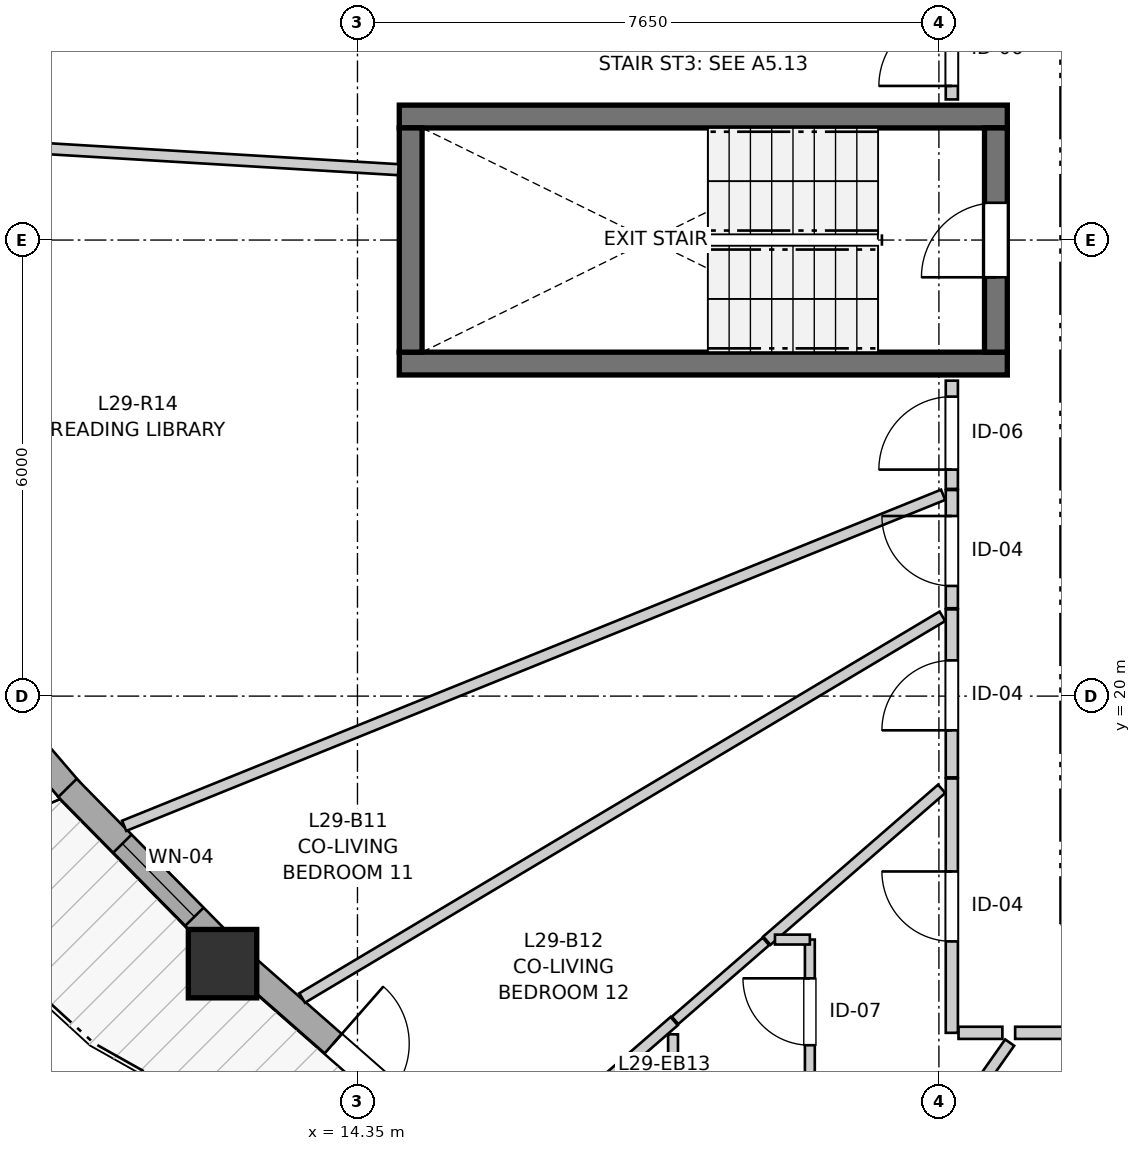
"""IFC4 building model, lengths in metres.
Left out: names, types, materials, properties, quantities, classifications, styles, units other than length and angle.
Written with IfcOpenShell. Run it as: python <this file> out.ifc"""

import sys

from ifc_helpers import new_model, si_unit, direction, frame, frame_2d, origin, origin_2d, place, context, subcontext, project, spatial, rectangle, extrude, source, transform, mapped, element, fill, save


model = new_model("IFC4")
c1 = context("Model", 3, precision=1e-05, world=origin(), true_north=direction((0.0, 1.0)))
c2 = subcontext(c1, "Body", "Model", "MODEL_VIEW")
j1 = project(units=[si_unit("LENGTHUNIT", "METRE"), si_unit("PLANEANGLEUNIT", "RADIAN")], contexts=[c1])
p1 = place(None, origin())
s1 = spatial("IfcSite", under=j1, at=p1, CompositionType="ELEMENT")
p2 = place(p1, origin())
s2 = spatial("IfcBuilding", under=s1, at=p2, CompositionType="ELEMENT")
p3 = place(p2, frame((0.0, 0.0, 99.2)))
s3 = spatial("IfcBuildingStorey", under=s2, at=p3, CompositionType="ELEMENT", Elevation=99.2)
for number, where, z_axis, x_axis in (
    (1, (14.9, 24.375, 0.0), (0.0, 0.0, 1.0), (1.0, 0.0, 0.0)),
    (2, (22.9, 27.625, 0.0), (0.0, 0.0, 1.0), (-1.0, 0.0, 0.0)),
):
    element("IfcWall", number, at=place(p3, frame(where, z_axis=z_axis, x_axis=x_axis)), inside=s3, PredefinedType="SHEAR", context=c2, shape_type="SweptSolid", body=[
        extrude(rectangle(XDim=8.0, YDim=0.3, at=frame_2d((4.0, 0.0))), origin(), (0.0, 0.0, 1.0), 2.95),
    ])
p4 = place(p3, frame((15.05, 27.475, 0.0), z_axis=(0.0, 0.0, 1.0), x_axis=(0.0, -1.0, 0.0)))
e3 = element("IfcWall", 3, at=p4, inside=s3, PredefinedType="SHEAR", context=c2, shape_type="SweptSolid", body=[
    extrude(rectangle(XDim=2.95, YDim=0.3, at=frame_2d((1.475, 0.0))), origin(), (0.0, 0.0, 1.0), 2.95),
])
p5 = place(p3, frame((22.75, 24.525, 0.0), z_axis=(0.0, 0.0, 1.0), x_axis=(0.0, 1.0, 0.0)))
e4 = element("IfcWall", 4, at=p5, inside=s3, PredefinedType="SHEAR", context=c2, shape_type="SweptSolid", body=[
    extrude(rectangle(XDim=2.95, YDim=0.3, at=frame_2d((1.475, 0.0))), origin(), (0.0, 0.0, 1.0), 2.95),
])
p6 = place(p5, frame((0.985, 0.0, 0.0)))
e5 = element("IfcOpeningElement", 5, at=p6, cuts=e4, PredefinedType="OPENING", context=c2, shape_type="SweptSolid", body=[
    extrude(rectangle(XDim=0.98, YDim=2.15, at=frame_2d((0.49, 1.075))), frame((0.0, 0.16, 0.0), z_axis=(0.0, -1.0, 0.0), x_axis=(1.0, 0.0, 0.0)), (0.0, 0.0, 1.0), 0.32),
])
m1 = source(origin(), c2, "Body", "SweptSolid", [
    extrude(rectangle(XDim=0.9, YDim=0.9, at=origin_2d()), origin(), (0.0, 0.0, 1.0), 2.95),
])
p7 = place(p3, frame((12.575, 16.48, 0.0), z_axis=(0.0, 0.0, 1.0), x_axis=(1.0, 0.0, 0.0)))
e6 = element("IfcColumn", 6, at=p7, inside=s3, PredefinedType="COLUMN", context=c2, shape_type="MappedRepresentation", body=[
    mapped(m1, transform((0.0, 0.0, 0.0), x_axis=(1.0, 0.0, 0.0), y_axis=(0.0, 1.0, 0.0), z_axis=(0.0, 0.0, 1.0), scale=1.0)),
])
p8 = place(p3, frame((8.562, 21.099, 0.0), z_axis=(0.0, 0.0, 1.0), x_axis=(0.650778499588, -0.75926763692, 0.0)))
e7 = element("IfcWall", 7, at=p8, inside=s3, PredefinedType="SOLIDWALL", context=c2, shape_type="SweptSolid", body=[
    extrude(rectangle(XDim=3.124, YDim=0.34, at=frame_2d((1.562, 0.0))), origin(), (0.0, 0.0, 1.0), 2.48),
])
p9 = place(p8, frame((0.727, 0.0, 0.82)))
e8 = element("IfcOpeningElement", 8, at=p9, cuts=e7, PredefinedType="OPENING", context=c2, shape_type="SweptSolid", body=[
    extrude(rectangle(XDim=1.65, YDim=1.45, at=frame_2d((0.825, 0.725))), frame((0.0, 0.18, 0.0), z_axis=(0.0, -1.0, 0.0), x_axis=(1.0, 0.0, 0.0)), (0.0, 0.0, 1.0), 0.36),
])
p10 = place(p3, frame((10.535, 18.792, 0.0), z_axis=(0.0, 0.0, 1.0), x_axis=(0.701902141766, -0.7122733909, 0.0)))
e9 = element("IfcWall", 9, at=p10, inside=s3, PredefinedType="SOLIDWALL", context=c2, shape_type="SweptSolid", body=[
    extrude(rectangle(XDim=2.848, YDim=0.34, at=frame_2d((1.424, 0.0))), origin(), (0.0, 0.0, 1.0), 2.48),
])
p11 = place(p10, frame((1.029, 0.0, 0.82)))
e10 = element("IfcOpeningElement", 10, at=p11, cuts=e9, PredefinedType="OPENING", context=c2, shape_type="SweptSolid", body=[
    extrude(rectangle(XDim=1.35, YDim=1.45, at=frame_2d((0.675, 0.725))), frame((0.0, 0.18, 0.0), z_axis=(0.0, -1.0, 0.0), x_axis=(1.0, 0.0, 0.0)), (0.0, 0.0, 1.0), 0.36),
])
p12 = place(p3, frame((12.86, 16.456, 0.0), z_axis=(0.0, 0.0, 1.0), x_axis=(0.751500349331, -0.659732692047, 0.0)))
e11 = element("IfcWall", 11, at=p12, inside=s3, PredefinedType="SOLIDWALL", context=c2, shape_type="SweptSolid", body=[
    extrude(rectangle(XDim=2.799, YDim=0.34, at=frame_2d((1.399, 0.0))), origin(), (0.0, 0.0, 1.0), 2.48),
])
p13 = place(p12, frame((1.559, 0.0, 0.0)))
e12 = element("IfcOpeningElement", 12, at=p13, cuts=e11, PredefinedType="OPENING", context=c2, shape_type="SweptSolid", body=[
    extrude(rectangle(XDim=1.0, YDim=2.1, at=frame_2d((0.5, 1.05))), frame((0.0, 0.18, 0.0), z_axis=(0.0, -1.0, 0.0), x_axis=(1.0, 0.0, 0.0)), (0.0, 0.0, 1.0), 0.36),
])
p14 = place(p3, frame((26.473, 15.57, 0.0), z_axis=(0.0, 0.0, 1.0), x_axis=(-1.0, 0.0, 0.0)))
e13 = element("IfcWall", 13, at=p14, inside=s3, PredefinedType="PARTITIONING", context=c2, shape_type="SweptSolid", body=[
    extrude(rectangle(XDim=3.47, YDim=0.16, at=frame_2d((1.735, 0.0))), origin(), (0.0, 0.0, 1.0), 2.95),
])
p15 = place(p14, frame((1.274, 0.0, 0.0)))
e14 = element("IfcOpeningElement", 14, at=p15, cuts=e13, PredefinedType="OPENING", context=c2, shape_type="SweptSolid", body=[
    extrude(rectangle(XDim=0.92, YDim=2.1, at=frame_2d((0.46, 1.05))), frame((0.0, 0.09, 0.0), z_axis=(0.0, -1.0, 0.0), x_axis=(1.0, 0.0, 0.0)), (0.0, 0.0, 1.0), 0.18),
])
p16 = place(p3, frame((22.17, 15.57, 0.0), z_axis=(0.0, 0.0, 1.0), x_axis=(0.0, 1.0, 0.0)))
e15 = element("IfcWall", 15, at=p16, inside=s3, PredefinedType="PARTITIONING", context=c2, shape_type="SweptSolid", body=[
    extrude(rectangle(XDim=3.346, YDim=0.16, at=frame_2d((1.673, 0.0))), origin(), (0.0, 0.0, 1.0), 2.95),
])
p17 = place(p16, frame((1.203, 0.0, 0.0)))
e16 = element("IfcOpeningElement", 16, at=p17, cuts=e15, PredefinedType="OPENING", context=c2, shape_type="SweptSolid", body=[
    extrude(rectangle(XDim=0.92, YDim=2.1, at=frame_2d((0.46, 1.05))), frame((0.0, 0.09, 0.0), z_axis=(0.0, -1.0, 0.0), x_axis=(1.0, 0.0, 0.0)), (0.0, 0.0, 1.0), 0.18),
])
p18 = place(p3, frame((22.17, 18.931, 0.0), z_axis=(0.0, 0.0, 1.0), x_axis=(0.0, 1.0, 0.0)))
e17 = element("IfcWall", 17, at=p18, inside=s3, PredefinedType="PARTITIONING", context=c2, shape_type="SweptSolid", body=[
    extrude(rectangle(XDim=2.21, YDim=0.16, at=frame_2d((1.105, 0.0))), origin(), (0.0, 0.0, 1.0), 2.95),
])
p19 = place(p18, frame((0.619, 0.0, 0.0)))
e18 = element("IfcOpeningElement", 18, at=p19, cuts=e17, PredefinedType="OPENING", context=c2, shape_type="SweptSolid", body=[
    extrude(rectangle(XDim=0.92, YDim=2.1, at=frame_2d((0.46, 1.05))), frame((0.0, 0.09, 0.0), z_axis=(0.0, -1.0, 0.0), x_axis=(1.0, 0.0, 0.0)), (0.0, 0.0, 1.0), 0.18),
])
p20 = place(p3, frame((20.302, 14.897, 0.0), z_axis=(0.0, 0.0, 1.0), x_axis=(0.0, 1.0, 0.0)))
e19 = element("IfcWall", 19, at=p20, inside=s3, PredefinedType="PARTITIONING", context=c2, shape_type="SweptSolid", body=[
    extrude(rectangle(XDim=1.9, YDim=0.13, at=frame_2d((0.95, 0.0))), origin(), (0.0, 0.0, 1.0), 2.95),
])
p21 = place(p20, frame((0.51, 0.0, 0.0)))
e20 = element("IfcOpeningElement", 20, at=p21, cuts=e19, PredefinedType="OPENING", context=c2, shape_type="SweptSolid", body=[
    extrude(rectangle(XDim=0.88, YDim=2.05, at=frame_2d((0.44, 1.025))), frame((0.0, 0.075, 0.0), z_axis=(0.0, -1.0, 0.0), x_axis=(1.0, 0.0, 0.0)), (0.0, 0.0, 1.0), 0.15),
])
p22 = place(p3, frame((22.17, 21.156, 0.0), z_axis=(0.0, 0.0, 1.0), x_axis=(0.0, 1.0, 0.0)))
e21 = element("IfcWall", 21, at=p22, inside=s3, PredefinedType="PARTITIONING", context=c2, shape_type="SweptSolid", body=[
    extrude(rectangle(XDim=1.555, YDim=0.16, at=frame_2d((0.777, 0.0))), origin(), (0.0, 0.0, 1.0), 2.95),
])
p23 = place(p22, frame((0.293, 0.0, 0.0)))
e22 = element("IfcOpeningElement", 22, at=p23, cuts=e21, PredefinedType="OPENING", context=c2, shape_type="SweptSolid", body=[
    extrude(rectangle(XDim=0.92, YDim=2.1, at=frame_2d((0.46, 1.05))), frame((0.0, 0.09, 0.0), z_axis=(0.0, -1.0, 0.0), x_axis=(1.0, 0.0, 0.0)), (0.0, 0.0, 1.0), 0.18),
])
p24 = place(p3, frame((22.17, 22.726, 0.0), z_axis=(0.0, 0.0, 1.0), x_axis=(0.0, 1.0, 0.0)))
e23 = element("IfcWall", 23, at=p24, inside=s3, PredefinedType="PARTITIONING", context=c2, shape_type="SweptSolid", body=[
    extrude(rectangle(XDim=1.424, YDim=0.16, at=frame_2d((0.712, 0.0))), origin(), (0.0, 0.0, 1.0), 2.95),
])
p25 = place(p24, frame((0.254, 0.0, 0.0)))
e24 = element("IfcOpeningElement", 24, at=p25, cuts=e23, PredefinedType="OPENING", context=c2, shape_type="SweptSolid", body=[
    extrude(rectangle(XDim=0.96, YDim=2.1, at=frame_2d((0.48, 1.05))), frame((0.0, 0.09, 0.0), z_axis=(0.0, -1.0, 0.0), x_axis=(1.0, 0.0, 0.0)), (0.0, 0.0, 1.0), 0.18),
])
p26 = place(p3, frame((22.17, 27.85, 0.0), z_axis=(0.0, 0.0, 1.0), x_axis=(0.0, 1.0, 0.0)))
e25 = element("IfcWall", 25, at=p26, inside=s3, PredefinedType="PARTITIONING", context=c2, shape_type="SweptSolid", body=[
    extrude(rectangle(XDim=1.283, YDim=0.16, at=frame_2d((0.642, 0.0))), origin(), (0.0, 0.0, 1.0), 2.95),
])
p27 = place(p26, frame((0.177, 0.0, 0.0)))
e26 = element("IfcOpeningElement", 26, at=p27, cuts=e25, PredefinedType="OPENING", context=c2, shape_type="SweptSolid", body=[
    extrude(rectangle(XDim=0.96, YDim=2.1, at=frame_2d((0.48, 1.05))), frame((0.0, 0.09, 0.0), z_axis=(0.0, -1.0, 0.0), x_axis=(1.0, 0.0, 0.0)), (0.0, 0.0, 1.0), 0.18),
])
p28 = place(p3, frame((11.28, 18.294, 0.0), z_axis=(0.0, 0.0, 1.0), x_axis=(0.927137862507, 0.374720407645, 0.0)))
e27 = element("IfcWall", 27, at=p28, inside=s3, PredefinedType="PARTITIONING", context=c2, shape_type="SweptSolid", body=[
    extrude(rectangle(XDim=11.622, YDim=0.145, at=frame_2d((5.811, 0.0))), origin(), (0.0, 0.0, 1.0), 2.95),
])
p29 = place(p3, frame((13.622, 16.028, 0.0), z_axis=(0.0, 0.0, 1.0), x_axis=(0.85896108151, 0.512040877716, 0.0)))
e28 = element("IfcWall", 28, at=p29, inside=s3, PredefinedType="PARTITIONING", context=c2, shape_type="SweptSolid", body=[
    extrude(rectangle(XDim=9.807, YDim=0.145, at=frame_2d((4.904, 0.0))), origin(), (0.0, 0.0, 1.0), 2.95),
])
p30 = place(p3, frame((6.18, 27.448, 0.0), z_axis=(0.0, 0.0, 1.0), x_axis=(0.998209995059, -0.059806402362, 0.0)))
e29 = element("IfcWall", 29, at=p30, inside=s3, PredefinedType="PARTITIONING", context=c2, shape_type="SweptSolid", body=[
    extrude(rectangle(XDim=8.724, YDim=0.145, at=frame_2d((4.362, 0.0))), origin(), (0.0, 0.0, 1.0), 2.95),
])
p31 = place(p3, frame((19.736, 16.782, 0.0), z_axis=(0.0, 0.0, 1.0), x_axis=(0.754964216329, 0.655765988796, 0.0)))
e30 = element("IfcWall", 30, at=p31, inside=s3, PredefinedType="PARTITIONING", context=c2, shape_type="SweptSolid", body=[
    extrude(rectangle(XDim=3.047, YDim=0.145, at=frame_2d((1.523, 0.0))), origin(), (0.0, 0.0, 1.0), 2.95),
])
p32 = place(p3, frame((16.33, 13.824, 0.0), z_axis=(0.0, 0.0, 1.0), x_axis=(0.754843145593, 0.655905348013, 0.0)))
e31 = element("IfcWall", 31, at=p32, inside=s3, PredefinedType="PARTITIONING", context=c2, shape_type="SweptSolid", body=[
    extrude(rectangle(XDim=2.897, YDim=0.145, at=frame_2d((1.448, 0.0))), origin(), (0.0, 0.0, 1.0), 2.95),
])
p33 = place(p3, frame((18.528, 15.734, 0.0), z_axis=(0.0, 0.0, 1.0), x_axis=(0.755063236967, 0.655651971843, 0.0)))
e32 = element("IfcWall", 32, at=p33, inside=s3, PredefinedType="PARTITIONING", context=c2, shape_type="SweptSolid", body=[
    extrude(rectangle(XDim=1.584, YDim=0.13, at=frame_2d((0.792, 0.0))), origin(), (0.0, 0.0, 1.0), 2.95),
])
p34 = place(p3, frame((22.37, 14.643, 0.0), z_axis=(0.0, 0.0, 1.0), x_axis=(0.575022445487, 0.818137633401, 0.0)))
e33 = element("IfcWall", 33, at=p34, inside=s3, PredefinedType="PARTITIONING", context=c2, shape_type="SweptSolid", body=[
    extrude(rectangle(XDim=0.976, YDim=0.145, at=frame_2d((0.488, 0.0))), origin(), (0.0, 0.0, 1.0), 2.95),
])
p35 = place(p3, frame((22.258, 15.57, 0.0), z_axis=(0.0, 0.0, 1.0), x_axis=(1.0, 0.0, 0.0)))
e34 = element("IfcWall", 34, at=p35, inside=s3, PredefinedType="PARTITIONING", context=c2, shape_type="SweptSolid", body=[
    extrude(rectangle(XDim=0.577, YDim=0.16, at=frame_2d((0.289, 0.0))), origin(), (0.0, 0.0, 1.0), 2.95),
])
p36 = place(p3, frame((18.502, 14.97, 0.0), z_axis=(0.0, 0.0, 1.0), x_axis=(0.0, 1.0, 0.0)))
e35 = element("IfcWall", 35, at=p36, inside=s3, PredefinedType="PARTITIONING", context=c2, shape_type="SweptSolid", body=[
    extrude(rectangle(XDim=0.581, YDim=0.13, at=frame_2d((0.29, 0.0))), origin(), (0.0, 0.0, 1.0), 2.95),
])
p37 = place(p3, frame((19.843, 16.797, 0.0), z_axis=(0.0, 0.0, 1.0), x_axis=(1.0, 0.0, 0.0)))
e36 = element("IfcWall", 36, at=p37, inside=s3, PredefinedType="PARTITIONING", context=c2, shape_type="SweptSolid", body=[
    extrude(rectangle(XDim=0.459, YDim=0.13, at=frame_2d((0.229, 0.0))), origin(), (0.0, 0.0, 1.0), 2.95),
])
m2 = source(origin(), c2, "Body", "SweptSolid", [
    extrude(rectangle(XDim=1.35, YDim=1.45, at=frame_2d((0.675, 0.725))), frame((0.0, 0.03, 0.0), z_axis=(0.0, -1.0, 0.0), x_axis=(1.0, 0.0, 0.0)), (0.0, 0.0, 1.0), 0.06),
])
p38 = place(p11, origin())
e37 = element("IfcWindow", 37, at=p38, inside=s3, PartitioningType="SINGLE_PANEL", PredefinedType="WINDOW", context=c2, shape_type="MappedRepresentation", body=[
    mapped(m2, transform((0.0, 0.0, 0.0), x_axis=(1.0, 0.0, 0.0), y_axis=(0.0, 1.0, 0.0), z_axis=(0.0, 0.0, 1.0), scale=1.0)),
])
fill(e10, e37)
m3 = source(origin(), c2, "Body", "SweptSolid", [
    extrude(rectangle(XDim=1.0, YDim=2.1, at=frame_2d((0.5, 1.05))), frame((0.0, 0.025, 0.0), z_axis=(0.0, -1.0, 0.0), x_axis=(1.0, 0.0, 0.0)), (0.0, 0.0, 1.0), 0.05),
])
p39 = place(p13, origin())
e38 = element("IfcDoor", 38, at=p39, inside=s3, OperationType="SINGLE_SWING_LEFT", PredefinedType="DOOR", context=c2, shape_type="MappedRepresentation", body=[
    mapped(m3, transform((0.0, 0.0, 0.0), x_axis=(1.0, 0.0, 0.0), y_axis=(0.0, 1.0, 0.0), z_axis=(0.0, 0.0, 1.0), scale=1.0)),
])
fill(e12, e38)
m4 = source(origin(), c2, "Body", "SweptSolid", [
    extrude(rectangle(XDim=0.98, YDim=2.15, at=frame_2d((0.49, 1.075))), frame((0.0, 0.025, 0.0), z_axis=(0.0, -1.0, 0.0), x_axis=(1.0, 0.0, 0.0)), (0.0, 0.0, 1.0), 0.05),
])
p40 = place(p6, origin())
e39 = element("IfcDoor", 39, at=p40, inside=s3, OperationType="SINGLE_SWING_LEFT", PredefinedType="DOOR", context=c2, shape_type="MappedRepresentation", body=[
    mapped(m4, transform((0.0, 0.0, 0.0), x_axis=(1.0, 0.0, 0.0), y_axis=(0.0, 1.0, 0.0), z_axis=(0.0, 0.0, 1.0), scale=1.0)),
])
fill(e5, e39)
m5 = source(origin(), c2, "Body", "SweptSolid", [
    extrude(rectangle(XDim=0.92, YDim=2.1, at=frame_2d((0.46, 1.05))), frame((0.0, 0.025, 0.0), z_axis=(0.0, -1.0, 0.0), x_axis=(1.0, 0.0, 0.0)), (0.0, 0.0, 1.0), 0.05),
])
p41 = place(p17, origin())
e40 = element("IfcDoor", 40, at=p41, inside=s3, OperationType="SINGLE_SWING_RIGHT", PredefinedType="DOOR", context=c2, shape_type="MappedRepresentation", body=[
    mapped(m5, transform((0.0, 0.0, 0.0), x_axis=(1.0, 0.0, 0.0), y_axis=(0.0, 1.0, 0.0), z_axis=(0.0, 0.0, 1.0), scale=1.0)),
])
fill(e16, e40)
p42 = place(p19, origin())
e41 = element("IfcDoor", 41, at=p42, inside=s3, OperationType="SINGLE_SWING_LEFT", PredefinedType="DOOR", context=c2, shape_type="MappedRepresentation", body=[
    mapped(m5, transform((0.0, 0.0, 0.0), x_axis=(1.0, 0.0, 0.0), y_axis=(0.0, 1.0, 0.0), z_axis=(0.0, 0.0, 1.0), scale=1.0)),
])
fill(e18, e41)
m6 = source(origin(), c2, "Body", "SweptSolid", [
    extrude(rectangle(XDim=0.88, YDim=2.05, at=frame_2d((0.44, 1.025))), frame((0.0, 0.025, 0.0), z_axis=(0.0, -1.0, 0.0), x_axis=(1.0, 0.0, 0.0)), (0.0, 0.0, 1.0), 0.05),
])
p43 = place(p21, origin())
e42 = element("IfcDoor", 42, at=p43, inside=s3, OperationType="SINGLE_SWING_RIGHT", PredefinedType="DOOR", context=c2, shape_type="MappedRepresentation", body=[
    mapped(m6, transform((0.0, 0.0, 0.0), x_axis=(1.0, 0.0, 0.0), y_axis=(0.0, 1.0, 0.0), z_axis=(0.0, 0.0, 1.0), scale=1.0)),
])
fill(e20, e42)
p44 = place(p23, origin())
e43 = element("IfcDoor", 43, at=p44, inside=s3, OperationType="SINGLE_SWING_RIGHT", PredefinedType="DOOR", context=c2, shape_type="MappedRepresentation", body=[
    mapped(m5, transform((0.0, 0.0, 0.0), x_axis=(1.0, 0.0, 0.0), y_axis=(0.0, 1.0, 0.0), z_axis=(0.0, 0.0, 1.0), scale=1.0)),
])
fill(e22, e43)
m7 = source(origin(), c2, "Body", "SweptSolid", [
    extrude(rectangle(XDim=0.96, YDim=2.1, at=frame_2d((0.48, 1.05))), frame((0.0, 0.025, 0.0), z_axis=(0.0, -1.0, 0.0), x_axis=(1.0, 0.0, 0.0)), (0.0, 0.0, 1.0), 0.05),
])
p45 = place(p25, origin())
e44 = element("IfcDoor", 44, at=p45, inside=s3, OperationType="SINGLE_SWING_LEFT", PredefinedType="DOOR", context=c2, shape_type="MappedRepresentation", body=[
    mapped(m7, transform((0.0, 0.0, 0.0), x_axis=(1.0, 0.0, 0.0), y_axis=(0.0, 1.0, 0.0), z_axis=(0.0, 0.0, 1.0), scale=1.0)),
])
fill(e24, e44)
p46 = place(p27, origin())
e45 = element("IfcDoor", 45, at=p46, inside=s3, OperationType="SINGLE_SWING_LEFT", PredefinedType="DOOR", context=c2, shape_type="MappedRepresentation", body=[
    mapped(m7, transform((0.0, 0.0, 0.0), x_axis=(1.0, 0.0, 0.0), y_axis=(0.0, 1.0, 0.0), z_axis=(0.0, 0.0, 1.0), scale=1.0)),
])
fill(e26, e45)
save(model, sys.argv[1])
